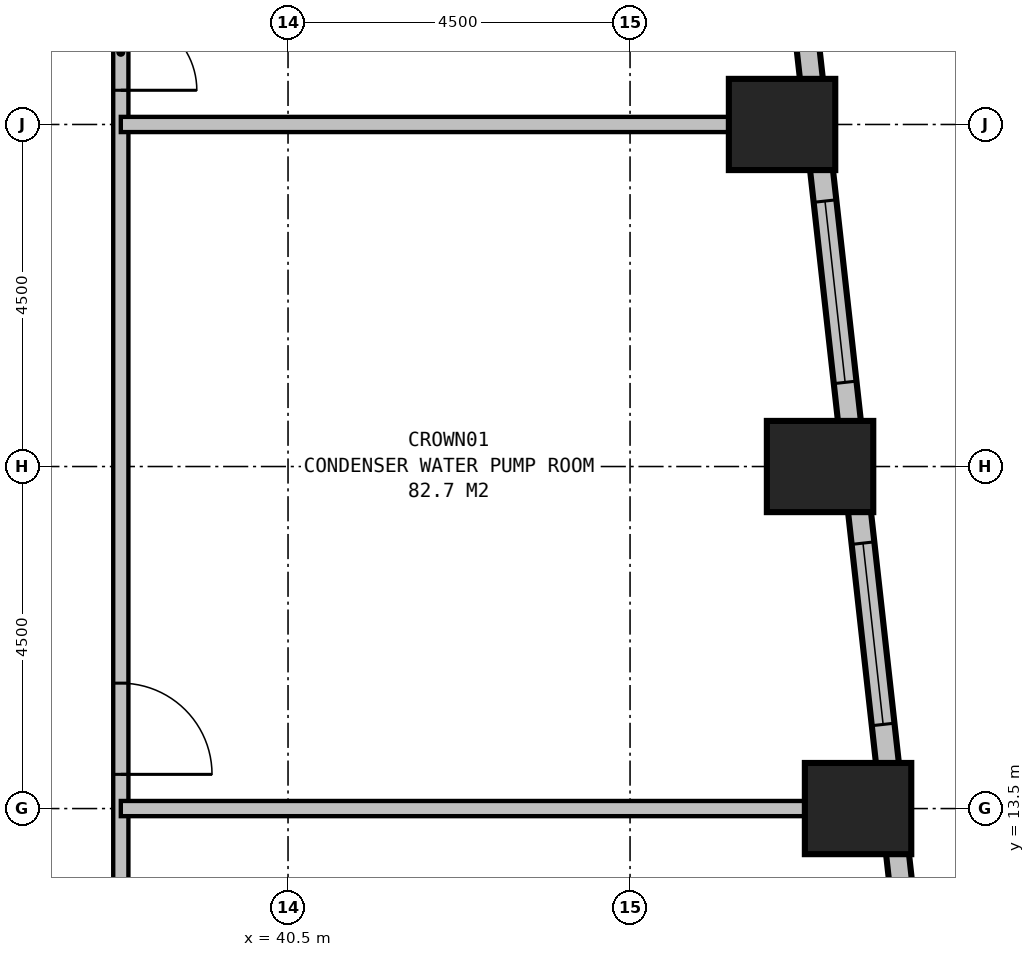
"""IFC4 building model, lengths in metres.
Left out: names, types, materials, properties, quantities, classifications, styles, units other than length and angle.
Written with IfcOpenShell. Run it as: python <this file> out.ifc"""

import sys

from ifc_helpers import new_model, si_unit, direction, frame, frame_2d, origin, origin_2d, place, context, subcontext, project, spatial, polyline, rectangle, outline, extrude, clip, halfspace, element, fill, save


model = new_model("IFC4")
c1 = context("Model", 3, precision=1e-05, world=origin(), true_north=direction((0.0, 1.0)))
c2 = subcontext(c1, "Body", "Model", "MODEL_VIEW")
j1 = project(units=[si_unit("LENGTHUNIT", "METRE"), si_unit("PLANEANGLEUNIT", "RADIAN")], contexts=[c1])
p1 = place(None, origin())
s1 = spatial("IfcSite", under=j1, at=p1, CompositionType="ELEMENT")
p2 = place(p1, origin())
s2 = spatial("IfcBuilding", under=s1, at=p2, CompositionType="ELEMENT")
p3 = place(p2, frame((0.0, 0.0, 289.7)))
s3 = spatial("IfcBuildingStorey", under=s2, at=p3, CompositionType="ELEMENT", Elevation=289.7)
p4 = place(p3, frame((48.0, 13.5, 0.0), z_axis=(0.0, 0.0, 1.0), x_axis=(1.0, 0.0, 0.0)))
e1 = element("IfcColumn", 1, at=p4, inside=s3, PredefinedType="COLUMN", context=c2, shape_type="Clipping", body=[
    clip(extrude(rectangle(XDim=1.4, YDim=1.2, at=origin_2d()), origin(), (0.0, 0.0, 1.0), 16.523), halfspace(frame((0.0, 0.0, 16.571), z_axis=(-0.294483896091, -0.25767390908, 0.920262675285), x_axis=(0.952424195267, 0.0, 0.304775576894)), False)),
])
p5 = place(p3, frame((47.5, 18.0, 0.0), z_axis=(0.0, 0.0, 1.0), x_axis=(1.0, 0.0, 0.0)))
e2 = element("IfcColumn", 2, at=p5, inside=s3, PredefinedType="COLUMN", context=c2, shape_type="Clipping", body=[
    clip(extrude(rectangle(XDim=1.4, YDim=1.2, at=origin_2d()), origin(), (0.0, 0.0, 1.0), 17.623), halfspace(frame((0.0, 0.0, 17.671), z_axis=(-0.294483896091, -0.25767390908, 0.920262675285), x_axis=(0.952424195267, 0.0, 0.304775576894)), False)),
])
p6 = place(p3, frame((47.0, 22.5, 0.0), z_axis=(0.0, 0.0, 1.0), x_axis=(1.0, 0.0, 0.0)))
e3 = element("IfcColumn", 3, at=p6, inside=s3, PredefinedType="COLUMN", context=c2, shape_type="Clipping", body=[
    clip(extrude(rectangle(XDim=1.4, YDim=1.2, at=origin_2d()), origin(), (0.0, 0.0, 1.0), 18.723), halfspace(frame((0.0, 0.0, 18.771), z_axis=(-0.294483896091, -0.25767390908, 0.920262675285), x_axis=(0.952424195267, 0.0, 0.304775576894)), False)),
])
p7 = place(p3, frame((49.519, 3.901, -0.3), z_axis=(0.0, 0.0, 1.0), x_axis=(-0.110429082637, 0.993884006164, 0.0)))
e4 = element("IfcWall", 4, at=p7, inside=s3, PredefinedType="STANDARD", context=c2, shape_type="Clipping", body=[
    clip(extrude(outline(polyline([(0.0, 0.0), (32.899, 0.0), (32.899, 22.662), (0.0, 14.669), (0.0, 0.0)])), frame((0.0, 0.15, 0.0), z_axis=(0.0, -1.0, 0.0), x_axis=(1.0, 0.0, 0.0)), (0.0, 0.0, 1.0), 0.3), halfspace(frame((0.0, 0.0, 14.669), z_axis=(-0.223578390543, 0.321137527797, 0.920262675285), x_axis=(0.971732868163, 0.0, 0.236083105984)), False)),
])
p8 = place(p7, frame((1.717, 0.0, 0.8)))
e5 = element("IfcOpeningElement", 5, at=p8, cuts=e4, PredefinedType="OPENING", context=c2, shape_type="SweptSolid", body=[
    extrude(rectangle(XDim=2.4, YDim=1.8, at=frame_2d((1.2, 0.9))), frame((0.0, 0.16, 0.0), z_axis=(0.0, -1.0, 0.0), x_axis=(1.0, 0.0, 0.0)), (0.0, 0.0, 1.0), 0.32),
])
p9 = place(p7, frame((6.245, 0.0, 0.8)))
e6 = element("IfcOpeningElement", 6, at=p9, cuts=e4, PredefinedType="OPENING", context=c2, shape_type="SweptSolid", body=[
    extrude(rectangle(XDim=2.4, YDim=1.8, at=frame_2d((1.2, 0.9))), frame((0.0, 0.16, 0.0), z_axis=(0.0, -1.0, 0.0), x_axis=(1.0, 0.0, 0.0)), (0.0, 0.0, 1.0), 0.32),
])
p10 = place(p7, frame((10.772, 0.0, 0.8)))
e7 = element("IfcOpeningElement", 7, at=p10, cuts=e4, PredefinedType="OPENING", context=c2, shape_type="SweptSolid", body=[
    extrude(rectangle(XDim=2.4, YDim=1.8, at=frame_2d((1.2, 0.9))), frame((0.0, 0.16, 0.0), z_axis=(0.0, -1.0, 0.0), x_axis=(1.0, 0.0, 0.0)), (0.0, 0.0, 1.0), 0.32),
])
p11 = place(p7, frame((15.3, 0.0, 0.8)))
e8 = element("IfcOpeningElement", 8, at=p11, cuts=e4, PredefinedType="OPENING", context=c2, shape_type="SweptSolid", body=[
    extrude(rectangle(XDim=2.4, YDim=1.8, at=frame_2d((1.2, 0.9))), frame((0.0, 0.16, 0.0), z_axis=(0.0, -1.0, 0.0), x_axis=(1.0, 0.0, 0.0)), (0.0, 0.0, 1.0), 0.32),
])
p12 = place(p7, frame((19.828, 0.0, 0.8)))
e9 = element("IfcOpeningElement", 9, at=p12, cuts=e4, PredefinedType="OPENING", context=c2, shape_type="SweptSolid", body=[
    extrude(rectangle(XDim=2.4, YDim=1.8, at=frame_2d((1.2, 0.9))), frame((0.0, 0.16, 0.0), z_axis=(0.0, -1.0, 0.0), x_axis=(1.0, 0.0, 0.0)), (0.0, 0.0, 1.0), 0.32),
])
p13 = place(p7, frame((24.355, 0.0, 0.8)))
e10 = element("IfcOpeningElement", 10, at=p13, cuts=e4, PredefinedType="OPENING", context=c2, shape_type="SweptSolid", body=[
    extrude(rectangle(XDim=2.4, YDim=1.8, at=frame_2d((1.2, 0.9))), frame((0.0, 0.16, 0.0), z_axis=(0.0, -1.0, 0.0), x_axis=(1.0, 0.0, 0.0)), (0.0, 0.0, 1.0), 0.32),
])
p14 = place(p7, frame((28.883, 0.0, 0.8)))
e11 = element("IfcOpeningElement", 11, at=p14, cuts=e4, PredefinedType="OPENING", context=c2, shape_type="SweptSolid", body=[
    extrude(rectangle(XDim=2.4, YDim=1.8, at=frame_2d((1.2, 0.9))), frame((0.0, 0.16, 0.0), z_axis=(0.0, -1.0, 0.0), x_axis=(1.0, 0.0, 0.0)), (0.0, 0.0, 1.0), 0.32),
])
p15 = place(p3, frame((38.3, 11.2, 0.0), z_axis=(0.0, 0.0, 1.0), x_axis=(0.0, 1.0, 0.0)))
e12 = element("IfcWall", 12, at=p15, inside=s3, PredefinedType="PARTITIONING", context=c2, shape_type="SweptSolid", body=[
    extrude(rectangle(XDim=18.1, YDim=0.2, at=frame_2d((9.05, 0.0))), origin(), (0.0, 0.0, 1.0), 4.0),
])
p16 = place(p15, frame((3.95, 0.0, 0.0), z_axis=(0.0, 0.0, 1.0), x_axis=(-1.0, 0.0, 0.0)))
e13 = element("IfcOpeningElement", 13, at=p16, cuts=e12, PredefinedType="OPENING", context=c2, shape_type="SweptSolid", body=[
    extrude(rectangle(XDim=1.2, YDim=2.1, at=frame_2d((0.6, 1.05))), frame((0.0, 0.11, 0.0), z_axis=(0.0, -1.0, 0.0), x_axis=(1.0, 0.0, 0.0)), (0.0, 0.0, 1.0), 0.22),
])
p17 = place(p15, frame((12.75, 0.0, 0.0), z_axis=(0.0, 0.0, 1.0), x_axis=(-1.0, 0.0, 0.0)))
e14 = element("IfcOpeningElement", 14, at=p17, cuts=e12, PredefinedType="OPENING", context=c2, shape_type="SweptSolid", body=[
    extrude(rectangle(XDim=1.0, YDim=2.1, at=frame_2d((0.5, 1.05))), frame((0.0, 0.11, 0.0), z_axis=(0.0, -1.0, 0.0), x_axis=(1.0, 0.0, 0.0)), (0.0, 0.0, 1.0), 0.22),
])
p18 = place(p3, frame((38.3, 13.5, 0.0), z_axis=(0.0, 0.0, 1.0), x_axis=(1.0, 0.0, 0.0)))
e15 = element("IfcWall", 15, at=p18, inside=s3, PredefinedType="PARTITIONING", context=c2, shape_type="SweptSolid", body=[
    extrude(rectangle(XDim=8.999, YDim=0.2, at=frame_2d((4.5, 0.0))), origin(), (0.0, 0.0, 1.0), 4.0),
])
p19 = place(p3, frame((38.3, 22.5, 0.0), z_axis=(0.0, 0.0, 1.0), x_axis=(1.0, 0.0, 0.0)))
e16 = element("IfcWall", 16, at=p19, inside=s3, PredefinedType="PARTITIONING", context=c2, shape_type="SweptSolid", body=[
    extrude(rectangle(XDim=7.999, YDim=0.2, at=frame_2d((4.0, 0.0))), origin(), (0.0, 0.0, 1.0), 4.0),
])
p20 = place(p10, origin())
e17 = element("IfcWindow", 17, at=p20, inside=s3, PartitioningType="SINGLE_PANEL", PredefinedType="USERDEFINED", context=c2, shape_type="SweptSolid", body=[
    extrude(rectangle(XDim=2.4, YDim=1.8, at=frame_2d((1.2, 0.9))), frame((0.0, 0.03, 0.0), z_axis=(0.0, -1.0, 0.0), x_axis=(1.0, 0.0, 0.0)), (0.0, 0.0, 1.0), 0.06),
])
fill(e7, e17)
p21 = place(p11, origin())
e18 = element("IfcWindow", 18, at=p21, inside=s3, PartitioningType="SINGLE_PANEL", PredefinedType="USERDEFINED", context=c2, shape_type="SweptSolid", body=[
    extrude(rectangle(XDim=2.4, YDim=1.8, at=frame_2d((1.2, 0.9))), frame((0.0, 0.03, 0.0), z_axis=(0.0, -1.0, 0.0), x_axis=(1.0, 0.0, 0.0)), (0.0, 0.0, 1.0), 0.06),
])
fill(e8, e18)
p22 = place(p16, origin())
e19 = element("IfcDoor", 19, at=p22, inside=s3, OperationType="SINGLE_SWING_RIGHT", PredefinedType="DOOR", context=c2, shape_type="SweptSolid", body=[
    extrude(rectangle(XDim=1.2, YDim=2.1, at=frame_2d((0.6, 1.05))), frame((0.0, 0.025, 0.0), z_axis=(0.0, -1.0, 0.0), x_axis=(1.0, 0.0, 0.0)), (0.0, 0.0, 1.0), 0.05),
])
fill(e13, e19)
p23 = place(p17, origin())
e20 = element("IfcDoor", 20, at=p23, inside=s3, OperationType="SINGLE_SWING_RIGHT", PredefinedType="DOOR", context=c2, shape_type="SweptSolid", body=[
    extrude(rectangle(XDim=1.0, YDim=2.1, at=frame_2d((0.5, 1.05))), frame((0.0, 0.025, 0.0), z_axis=(0.0, -1.0, 0.0), x_axis=(1.0, 0.0, 0.0)), (0.0, 0.0, 1.0), 0.05),
])
fill(e14, e20)
save(model, sys.argv[1])
